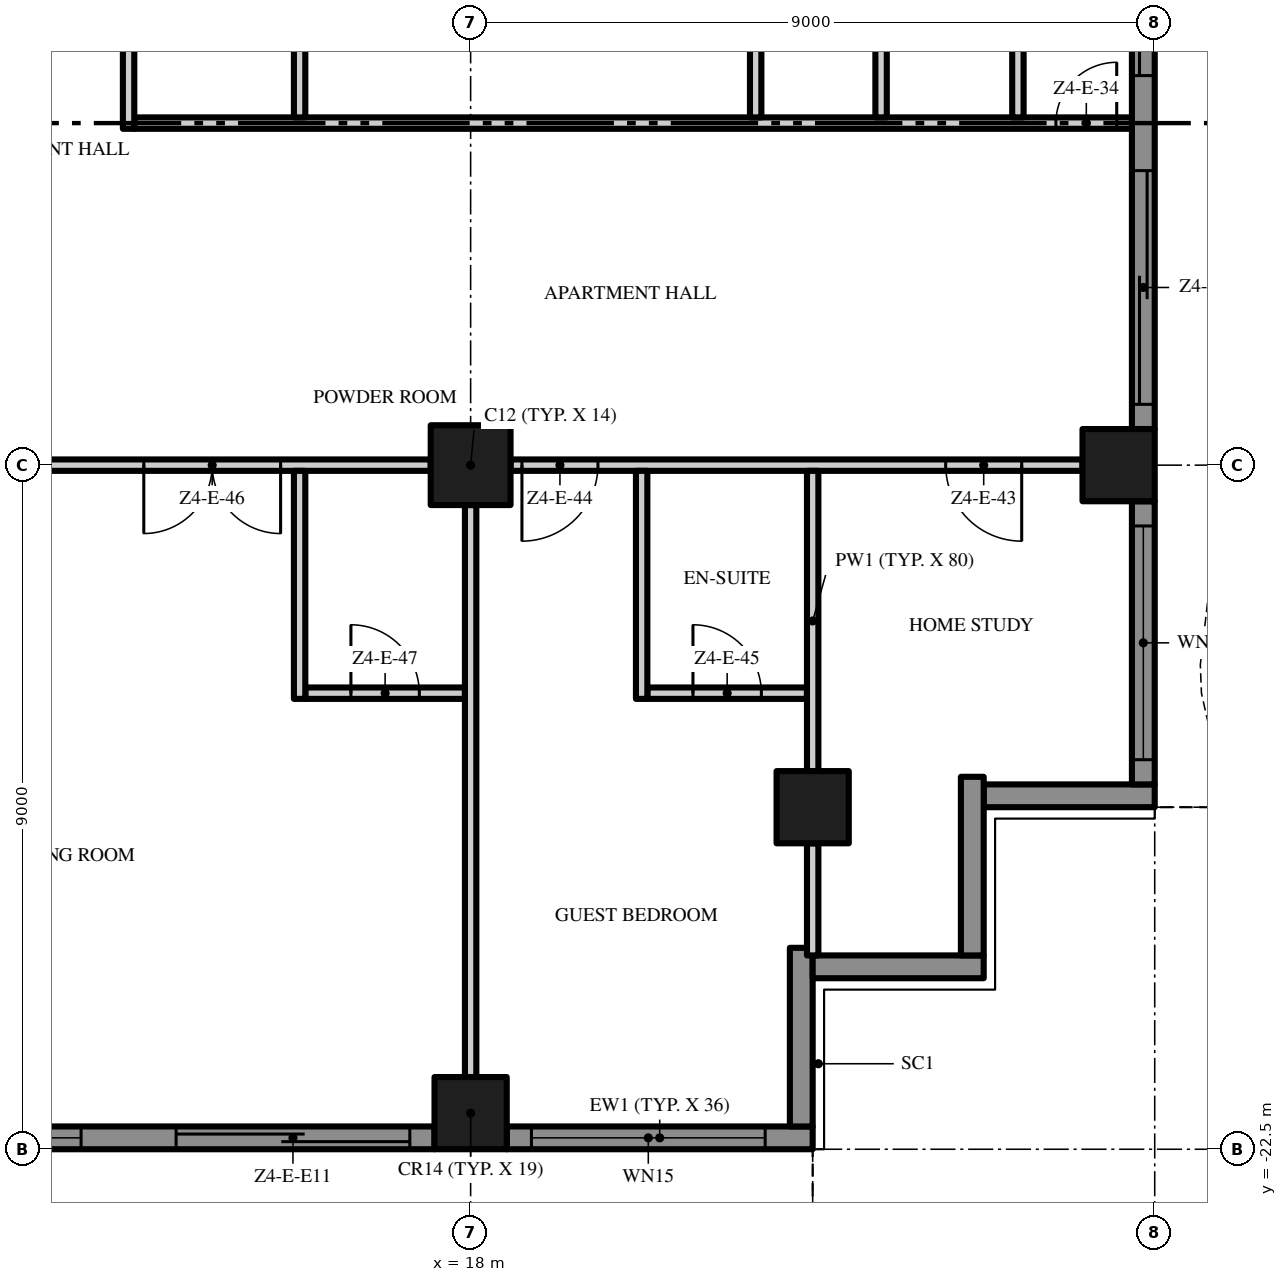
"""IFC4 building model, lengths in metres.
Left out: names, types, materials, properties, quantities, classifications, styles, units other than length and angle.
Written with IfcOpenShell. Run it as: python <this file> out.ifc"""

import sys

from ifc_helpers import new_model, si_unit, direction, frame, frame_2d, origin, origin_2d, place, context, subcontext, project, spatial, polyline, rectangle, outline, extrude, element, fill, save


model = new_model("IFC4")
c1 = context("Model", 3, precision=1e-05, world=origin(), true_north=direction((0.0, 1.0)))
c2 = subcontext(c1, "Body", "Model", "MODEL_VIEW")
j1 = project(units=[si_unit("LENGTHUNIT", "METRE"), si_unit("PLANEANGLEUNIT", "RADIAN")], contexts=[c1])
p1 = place(None, origin())
s1 = spatial("IfcSite", under=j1, at=p1, CompositionType="ELEMENT")
p2 = place(p1, origin())
s2 = spatial("IfcBuilding", under=s1, at=p2, CompositionType="ELEMENT")
p3 = place(p2, frame((0.0, 0.0, 230.0)))
s3 = spatial("IfcBuildingStorey", under=s2, at=p3, CompositionType="ELEMENT", Elevation=230.0)
p4 = place(p3, frame((18.0, -13.5, 0.0), z_axis=(0.0, 0.0, 1.0), x_axis=(1.0, 0.0, 0.0)))
e1 = element("IfcColumn", 1, at=p4, inside=s3, PredefinedType="COLUMN", context=c2, shape_type="SweptSolid", body=[
    extrude(rectangle(XDim=1.05, YDim=1.05, at=origin_2d()), origin(), (0.0, 0.0, 1.0), 3.5),
])
for number, where, z_axis, x_axis in (
    (2, (18.0, -22.025, 0.0), (0.0, 0.0, 1.0), (1.0, 0.0, 0.0)),
    (3, (26.525, -13.5, 0.0), (0.0, 0.0, 1.0), (1.0, 0.0, 0.0)),
    (4, (22.5, -18.0, 0.0), (0.0, 0.0, 1.0), (1.0, 0.0, 0.0)),
):
    element("IfcColumn", number, at=place(p3, frame(where, z_axis=z_axis, x_axis=x_axis)), inside=s3, PredefinedType="COLUMN", context=c2, shape_type="SweptSolid", body=[
        extrude(rectangle(XDim=0.95, YDim=0.95, at=origin_2d()), origin(), (0.0, 0.0, 1.0), 3.5),
    ])
p5 = place(p3, frame((17.525, -22.35, 0.0), z_axis=(0.0, 0.0, 1.0), x_axis=(-1.0, 0.0, 0.0)))
e5 = element("IfcWall", 5, at=p5, inside=s3, PredefinedType="SOLIDWALL", context=c2, shape_type="SweptSolid", body=[
    extrude(rectangle(XDim=8.05, YDim=0.3, at=frame_2d((4.025, 0.0))), origin(), (0.0, 0.0, 1.0), 3.5),
])
p6 = place(p5, frame((4.65, 0.0, 0.45)))
e6 = element("IfcOpeningElement", 6, at=p6, cuts=e5, PredefinedType="OPENING", context=c2, shape_type="SweptSolid", body=[
    extrude(rectangle(XDim=3.075, YDim=2.65, at=frame_2d((1.538, 1.325))), frame((0.0, 0.16, 0.0), z_axis=(0.0, -1.0, 0.0), x_axis=(1.0, 0.0, 0.0)), (0.0, 0.0, 1.0), 0.32),
])
p7 = place(p5, frame((0.325, 0.0, 0.0)))
e7 = element("IfcOpeningElement", 7, at=p7, cuts=e5, PredefinedType="OPENING", context=c2, shape_type="SweptSolid", body=[
    extrude(rectangle(XDim=3.075, YDim=2.4, at=frame_2d((1.538, 1.2))), frame((0.0, 0.16, 0.0), z_axis=(0.0, -1.0, 0.0), x_axis=(1.0, 0.0, 0.0)), (0.0, 0.0, 1.0), 0.32),
])
p8 = place(p3, frame((22.5, -22.35, 0.0), z_axis=(0.0, 0.0, 1.0), x_axis=(-1.0, 0.0, 0.0)))
e8 = element("IfcWall", 8, at=p8, inside=s3, PredefinedType="SOLIDWALL", context=c2, shape_type="SweptSolid", body=[
    extrude(rectangle(XDim=4.025, YDim=0.3, at=frame_2d((2.013, 0.0))), origin(), (0.0, 0.0, 1.0), 3.5),
])
p9 = place(p8, frame((0.625, 0.0, 0.45)))
e9 = element("IfcOpeningElement", 9, at=p9, cuts=e8, PredefinedType="OPENING", context=c2, shape_type="SweptSolid", body=[
    extrude(rectangle(XDim=3.075, YDim=2.65, at=frame_2d((1.538, 1.325))), frame((0.0, 0.16, 0.0), z_axis=(0.0, -1.0, 0.0), x_axis=(1.0, 0.0, 0.0)), (0.0, 0.0, 1.0), 0.32),
])
p10 = place(p3, frame((22.35, -19.85, 0.0), z_axis=(0.0, 0.0, 1.0), x_axis=(0.0, -1.0, 0.0)))
e10 = element("IfcWall", 10, at=p10, inside=s3, PredefinedType="SOLIDWALL", context=c2, shape_type="SweptSolid", body=[
    extrude(rectangle(XDim=2.35, YDim=0.3, at=frame_2d((1.175, 0.0))), origin(), (0.0, 0.0, 1.0), 3.5),
])
p11 = place(p3, frame((24.75, -20.1, 0.0), z_axis=(0.0, 0.0, 1.0), x_axis=(-1.0, 0.0, 0.0)))
e11 = element("IfcWall", 11, at=p11, inside=s3, PredefinedType="SOLIDWALL", context=c2, shape_type="SweptSolid", body=[
    extrude(rectangle(XDim=2.25, YDim=0.3, at=frame_2d((1.125, 0.0))), origin(), (0.0, 0.0, 1.0), 3.5),
])
p12 = place(p3, frame((24.6, -17.6, 0.0), z_axis=(0.0, 0.0, 1.0), x_axis=(0.0, -1.0, 0.0)))
e12 = element("IfcWall", 12, at=p12, inside=s3, PredefinedType="SOLIDWALL", context=c2, shape_type="SweptSolid", body=[
    extrude(rectangle(XDim=2.35, YDim=0.3, at=frame_2d((1.175, 0.0))), origin(), (0.0, 0.0, 1.0), 3.5),
])
p13 = place(p3, frame((27.0, -17.85, 0.0), z_axis=(0.0, 0.0, 1.0), x_axis=(-1.0, 0.0, 0.0)))
e13 = element("IfcWall", 13, at=p13, inside=s3, PredefinedType="SOLIDWALL", context=c2, shape_type="SweptSolid", body=[
    extrude(rectangle(XDim=2.25, YDim=0.3, at=frame_2d((1.125, 0.0))), origin(), (0.0, 0.0, 1.0), 3.5),
])
p14 = place(p3, frame((26.85, -13.975, 0.0), z_axis=(0.0, 0.0, 1.0), x_axis=(0.0, -1.0, 0.0)))
e14 = element("IfcWall", 14, at=p14, inside=s3, PredefinedType="SOLIDWALL", context=c2, shape_type="SweptSolid", body=[
    extrude(rectangle(XDim=3.725, YDim=0.3, at=frame_2d((1.863, 0.0))), origin(), (0.0, 0.0, 1.0), 3.5),
])
p15 = place(p14, frame((0.325, 0.0, 0.45)))
e15 = element("IfcOpeningElement", 15, at=p15, cuts=e14, PredefinedType="OPENING", context=c2, shape_type="SweptSolid", body=[
    extrude(rectangle(XDim=3.075, YDim=2.65, at=frame_2d((1.538, 1.325))), frame((0.0, 0.16, 0.0), z_axis=(0.0, -1.0, 0.0), x_axis=(1.0, 0.0, 0.0)), (0.0, 0.0, 1.0), 0.32),
])
p16 = place(p3, frame((26.85, -4.975, 0.0), z_axis=(0.0, 0.0, 1.0), x_axis=(0.0, -1.0, 0.0)))
e16 = element("IfcWall", 16, at=p16, inside=s3, PredefinedType="SOLIDWALL", context=c2, shape_type="SweptSolid", body=[
    extrude(rectangle(XDim=8.05, YDim=0.3, at=frame_2d((4.025, 0.0))), origin(), (0.0, 0.0, 1.0), 3.5),
])
p17 = place(p16, frame((4.65, 0.0, 0.0)))
e17 = element("IfcOpeningElement", 17, at=p17, cuts=e16, PredefinedType="OPENING", context=c2, shape_type="SweptSolid", body=[
    extrude(rectangle(XDim=3.075, YDim=2.4, at=frame_2d((1.538, 1.2))), frame((0.0, 0.16, 0.0), z_axis=(0.0, -1.0, 0.0), x_axis=(1.0, 0.0, 0.0)), (0.0, 0.0, 1.0), 0.32),
])
p18 = place(p16, frame((0.325, 0.0, 0.0)))
e18 = element("IfcOpeningElement", 18, at=p18, cuts=e16, PredefinedType="OPENING", context=c2, shape_type="SweptSolid", body=[
    extrude(rectangle(XDim=3.075, YDim=2.4, at=frame_2d((1.538, 1.2))), frame((0.0, 0.16, 0.0), z_axis=(0.0, -1.0, 0.0), x_axis=(1.0, 0.0, 0.0)), (0.0, 0.0, 1.0), 0.32),
])
p19 = place(p3, origin())
e19 = element("IfcWall", 19, at=p19, inside=s3, PredefinedType="USERDEFINED", context=c2, shape_type="SweptSolid", body=[
    extrude(outline(polyline([(-22.5, -23.451), (-21.0, -23.115), (-20.625, -23.1), (-19.5, -23.231), (-18.0, -23.755), (-16.5, -24.488), (-15.0, -25.149), (-13.5, -25.485), (-13.125, -25.5), (-12.0, -25.369), (-10.5, -24.845), (-9.0, -24.112), (-7.5, -23.451), (-6.0, -23.115), (-5.625, -23.1), (-4.5, -23.231), (-3.0, -23.755), (-1.5, -24.488), (0.0, -25.149), (1.5, -25.485), (1.875, -25.5), (3.0, -25.369), (4.5, -24.845), (6.0, -24.112), (7.5, -23.451), (9.0, -23.115), (9.375, -23.1), (10.5, -23.231), (12.0, -23.755), (13.5, -24.488), (15.0, -25.149), (16.5, -25.485), (16.875, -25.5), (18.0, -25.369), (19.5, -24.845), (21.0, -24.112), (22.5, -23.451), (22.399, -23.223), (20.895, -23.885), (19.404, -24.614), (17.944, -25.124), (16.865, -25.249), (16.533, -25.236), (15.079, -24.91), (13.605, -24.261), (12.096, -23.524), (10.556, -22.986), (9.385, -22.849), (8.967, -22.866), (7.421, -23.213), (5.895, -23.885), (4.404, -24.614), (2.944, -25.124), (1.865, -25.249), (1.533, -25.236), (0.079, -24.91), (-1.395, -24.261), (-2.904, -23.524), (-4.444, -22.986), (-5.615, -22.849), (-6.033, -22.866), (-7.579, -23.213), (-9.105, -23.885), (-10.596, -24.614), (-12.056, -25.124), (-13.135, -25.249), (-13.467, -25.236), (-14.921, -24.91), (-16.395, -24.261), (-17.904, -23.524), (-19.444, -22.986), (-20.615, -22.849), (-21.033, -22.866), (-22.555, -23.208), (-22.5, -23.451)])), origin(), (0.0, 0.0, 1.0), 0.9),
])
p20 = place(p3, origin())
e20 = element("IfcWall", 20, at=p20, inside=s3, PredefinedType="USERDEFINED", context=c2, shape_type="SweptSolid", body=[
    extrude(outline(polyline([(27.951, -18.0), (27.615, -16.5), (27.6, -16.125), (27.731, -15.0), (28.255, -13.5), (28.988, -12.0), (29.649, -10.5), (29.985, -9.0), (30.0, -8.625), (29.869, -7.5), (29.345, -6.0), (28.612, -4.5), (27.951, -3.0), (27.615, -1.5), (27.6, -1.125), (27.731, 0.0), (28.255, 1.5), (28.988, 3.0), (29.649, 4.5), (29.985, 6.0), (30.0, 6.375), (29.869, 7.5), (29.345, 9.0), (28.612, 10.5), (27.951, 12.0), (27.615, 13.5), (27.6, 13.875), (27.731, 15.0), (28.255, 16.5), (28.988, 18.0), (28.763, 18.11), (28.024, 16.596), (27.486, 15.056), (27.349, 13.885), (27.366, 13.467), (27.713, 11.921), (28.385, 10.395), (29.114, 8.904), (29.624, 7.444), (29.749, 6.365), (29.736, 6.033), (29.41, 4.579), (28.761, 3.105), (28.024, 1.596), (27.486, 0.056), (27.349, -1.115), (27.366, -1.533), (27.713, -3.079), (28.385, -4.605), (29.114, -6.096), (29.624, -7.556), (29.749, -8.635), (29.736, -8.967), (29.41, -10.421), (28.761, -11.895), (28.024, -13.404), (27.486, -14.944), (27.349, -16.115), (27.366, -16.533), (27.708, -18.055), (27.951, -18.0)])), origin(), (0.0, 0.0, 1.0), 0.9),
])
p21 = place(p3, frame((15.825, -16.5, 0.0), z_axis=(0.0, 0.0, 1.0), x_axis=(1.0, 0.0, 0.0)))
e21 = element("IfcWall", 21, at=p21, inside=s3, PredefinedType="PARTITIONING", context=c2, shape_type="SweptSolid", body=[
    extrude(rectangle(XDim=2.1, YDim=0.15, at=frame_2d((1.05, 0.0))), origin(), (0.0, 0.0, 1.0), 3.5),
])
p22 = place(p21, frame((0.6, 0.0, 0.0)))
e22 = element("IfcOpeningElement", 22, at=p22, cuts=e21, PredefinedType="OPENING", context=c2, shape_type="SweptSolid", body=[
    extrude(rectangle(XDim=0.9, YDim=2.1, at=frame_2d((0.45, 1.05))), frame((0.0, 0.085, 0.0), z_axis=(0.0, -1.0, 0.0), x_axis=(1.0, 0.0, 0.0)), (0.0, 0.0, 1.0), 0.17),
])
p23 = place(p3, frame((20.325, -16.5, 0.0), z_axis=(0.0, 0.0, 1.0), x_axis=(1.0, 0.0, 0.0)))
e23 = element("IfcWall", 23, at=p23, inside=s3, PredefinedType="PARTITIONING", context=c2, shape_type="SweptSolid", body=[
    extrude(rectangle(XDim=2.1, YDim=0.15, at=frame_2d((1.05, 0.0))), origin(), (0.0, 0.0, 1.0), 3.5),
])
p24 = place(p23, frame((0.6, 0.0, 0.0)))
e24 = element("IfcOpeningElement", 24, at=p24, cuts=e23, PredefinedType="OPENING", context=c2, shape_type="SweptSolid", body=[
    extrude(rectangle(XDim=0.9, YDim=2.1, at=frame_2d((0.45, 1.05))), frame((0.0, 0.085, 0.0), z_axis=(0.0, -1.0, 0.0), x_axis=(1.0, 0.0, 0.0)), (0.0, 0.0, 1.0), 0.17),
])
p25 = place(p3, frame((17.475, -13.5, 0.0), z_axis=(0.0, 0.0, 1.0), x_axis=(-1.0, 0.0, 0.0)))
e25 = element("IfcWall", 25, at=p25, inside=s3, PredefinedType="PARTITIONING", context=c2, shape_type="SweptSolid", body=[
    extrude(rectangle(XDim=7.95, YDim=0.15, at=frame_2d((3.975, 0.0))), origin(), (0.0, 0.0, 1.0), 3.5),
])
p26 = place(p25, frame((1.975, 0.0, 0.0)))
e26 = element("IfcOpeningElement", 26, at=p26, cuts=e25, PredefinedType="OPENING", context=c2, shape_type="SweptSolid", body=[
    extrude(rectangle(XDim=1.8, YDim=2.4, at=frame_2d((0.9, 1.2))), frame((0.0, 0.085, 0.0), z_axis=(0.0, -1.0, 0.0), x_axis=(1.0, 0.0, 0.0)), (0.0, 0.0, 1.0), 0.17),
])
p27 = place(p3, frame((26.05, -13.5, 0.0), z_axis=(0.0, 0.0, 1.0), x_axis=(-1.0, 0.0, 0.0)))
e27 = element("IfcWall", 27, at=p27, inside=s3, PredefinedType="PARTITIONING", context=c2, shape_type="SweptSolid", body=[
    extrude(rectangle(XDim=7.525, YDim=0.15, at=frame_2d((3.763, 0.0))), origin(), (0.0, 0.0, 1.0), 3.5),
])
p28 = place(p27, frame((0.8, 0.0, 0.0)))
e28 = element("IfcOpeningElement", 28, at=p28, cuts=e27, PredefinedType="OPENING", context=c2, shape_type="SweptSolid", body=[
    extrude(rectangle(XDim=1.0, YDim=2.4, at=frame_2d((0.5, 1.2))), frame((0.0, 0.085, 0.0), z_axis=(0.0, -1.0, 0.0), x_axis=(1.0, 0.0, 0.0)), (0.0, 0.0, 1.0), 0.17),
])
p29 = place(p27, frame((6.375, 0.0, 0.0)))
e29 = element("IfcOpeningElement", 29, at=p29, cuts=e27, PredefinedType="OPENING", context=c2, shape_type="SweptSolid", body=[
    extrude(rectangle(XDim=1.0, YDim=2.4, at=frame_2d((0.5, 1.2))), frame((0.0, 0.085, 0.0), z_axis=(0.0, -1.0, 0.0), x_axis=(1.0, 0.0, 0.0)), (0.0, 0.0, 1.0), 0.17),
])
p30 = place(p3, frame((13.575, -9.0, 0.0), z_axis=(0.0, 0.0, 1.0), x_axis=(1.0, 0.0, 0.0)))
e30 = element("IfcWall", 30, at=p30, inside=s3, PredefinedType="PARTITIONING", context=c2, shape_type="SweptSolid", body=[
    extrude(rectangle(XDim=13.125, YDim=0.15, at=frame_2d((6.562, 0.0))), origin(), (0.0, 0.0, 1.0), 3.5),
])
p31 = place(p30, frame((12.125, 0.0, 0.0)))
e31 = element("IfcOpeningElement", 31, at=p31, cuts=e30, PredefinedType="OPENING", context=c2, shape_type="SweptSolid", body=[
    extrude(rectangle(XDim=0.8, YDim=2.0, at=frame_2d((0.4, 1.0))), frame((0.0, 0.085, 0.0), z_axis=(0.0, -1.0, 0.0), x_axis=(1.0, 0.0, 0.0)), (0.0, 0.0, 1.0), 0.17),
])
p32 = place(p3, frame((13.5, -4.425, 0.0), z_axis=(0.0, 0.0, 1.0), x_axis=(0.0, -1.0, 0.0)))
e32 = element("IfcWall", 32, at=p32, inside=s3, PredefinedType="PARTITIONING", context=c2, shape_type="SweptSolid", body=[
    extrude(rectangle(XDim=4.65, YDim=0.15, at=frame_2d((2.325, 0.0))), origin(), (0.0, 0.0, 1.0), 3.5),
])
p33 = place(p32, frame((1.875, 0.0, 0.0)))
e33 = element("IfcOpeningElement", 33, at=p33, cuts=e32, PredefinedType="OPENING", context=c2, shape_type="SweptSolid", body=[
    extrude(rectangle(XDim=0.9, YDim=2.1, at=frame_2d((0.45, 1.05))), frame((0.0, 0.085, 0.0), z_axis=(0.0, -1.0, 0.0), x_axis=(1.0, 0.0, 0.0)), (0.0, 0.0, 1.0), 0.17),
])
p34 = place(p3, frame((15.75, -16.575, 0.0), z_axis=(0.0, 0.0, 1.0), x_axis=(0.0, 1.0, 0.0)))
e34 = element("IfcWall", 34, at=p34, inside=s3, PredefinedType="PARTITIONING", context=c2, shape_type="SweptSolid", body=[
    extrude(rectangle(XDim=3.0, YDim=0.15, at=frame_2d((1.5, 0.0))), origin(), (0.0, 0.0, 1.0), 3.5),
])
p35 = place(p3, frame((15.75, -8.925, 0.0), z_axis=(0.0, 0.0, 1.0), x_axis=(0.0, 1.0, 0.0)))
e35 = element("IfcWall", 35, at=p35, inside=s3, PredefinedType="PARTITIONING", context=c2, shape_type="SweptSolid", body=[
    extrude(rectangle(XDim=4.35, YDim=0.15, at=frame_2d((2.175, 0.0))), origin(), (0.0, 0.0, 1.0), 3.5),
])
p36 = place(p3, frame((18.0, -21.55, 0.0), z_axis=(0.0, 0.0, 1.0), x_axis=(0.0, 1.0, 0.0)))
e36 = element("IfcWall", 36, at=p36, inside=s3, PredefinedType="PARTITIONING", context=c2, shape_type="SweptSolid", body=[
    extrude(rectangle(XDim=7.525, YDim=0.15, at=frame_2d((3.763, 0.0))), origin(), (0.0, 0.0, 1.0), 3.5),
])
p37 = place(p3, frame((20.25, -16.575, 0.0), z_axis=(0.0, 0.0, 1.0), x_axis=(0.0, 1.0, 0.0)))
e37 = element("IfcWall", 37, at=p37, inside=s3, PredefinedType="PARTITIONING", context=c2, shape_type="SweptSolid", body=[
    extrude(rectangle(XDim=3.0, YDim=0.15, at=frame_2d((1.5, 0.0))), origin(), (0.0, 0.0, 1.0), 3.5),
])
p38 = place(p3, frame((21.75, -8.925, 0.0), z_axis=(0.0, 0.0, 1.0), x_axis=(0.0, 1.0, 0.0)))
e38 = element("IfcWall", 38, at=p38, inside=s3, PredefinedType="PARTITIONING", context=c2, shape_type="SweptSolid", body=[
    extrude(rectangle(XDim=4.35, YDim=0.15, at=frame_2d((2.175, 0.0))), origin(), (0.0, 0.0, 1.0), 3.5),
])
p39 = place(p3, frame((22.5, -19.95, 0.0), z_axis=(0.0, 0.0, 1.0), x_axis=(0.0, 1.0, 0.0)))
e39 = element("IfcWall", 39, at=p39, inside=s3, PredefinedType="PARTITIONING", context=c2, shape_type="SweptSolid", body=[
    extrude(rectangle(XDim=1.475, YDim=0.15, at=frame_2d((0.738, 0.0))), origin(), (0.0, 0.0, 1.0), 3.5),
])
p40 = place(p3, frame((22.5, -17.525, 0.0), z_axis=(0.0, 0.0, 1.0), x_axis=(0.0, 1.0, 0.0)))
e40 = element("IfcWall", 40, at=p40, inside=s3, PredefinedType="PARTITIONING", context=c2, shape_type="SweptSolid", body=[
    extrude(rectangle(XDim=3.95, YDim=0.15, at=frame_2d((1.975, 0.0))), origin(), (0.0, 0.0, 1.0), 3.5),
])
for number, where, z_axis, x_axis in (
    (41, (23.4, -8.925, 0.0), (0.0, 0.0, 1.0), (0.0, 1.0, 0.0)),
    (42, (25.2, -8.925, 0.0), (0.0, 0.0, 1.0), (0.0, 1.0, 0.0)),
):
    element("IfcWall", number, at=place(p3, frame(where, z_axis=z_axis, x_axis=x_axis)), inside=s3, PredefinedType="PARTITIONING", context=c2, shape_type="SweptSolid", body=[
        extrude(rectangle(XDim=4.35, YDim=0.15, at=frame_2d((2.175, 0.0))), origin(), (0.0, 0.0, 1.0), 3.5),
    ])
p41 = place(p6, origin())
e43 = element("IfcWindow", 43, at=p41, inside=s3, PartitioningType="SINGLE_PANEL", PredefinedType="WINDOW", context=c2, shape_type="SweptSolid", body=[
    extrude(rectangle(XDim=3.075, YDim=2.65, at=frame_2d((1.538, 1.325))), frame((0.0, 0.03, 0.0), z_axis=(0.0, -1.0, 0.0), x_axis=(1.0, 0.0, 0.0)), (0.0, 0.0, 1.0), 0.06),
])
fill(e6, e43)
p42 = place(p7, origin())
e44 = element("IfcDoor", 44, at=p42, inside=s3, OperationType="SINGLE_SWING_LEFT", PredefinedType="DOOR", context=c2, shape_type="SweptSolid", body=[
    extrude(rectangle(XDim=3.075, YDim=2.4, at=frame_2d((1.538, 1.2))), frame((0.0, 0.025, 0.0), z_axis=(0.0, -1.0, 0.0), x_axis=(1.0, 0.0, 0.0)), (0.0, 0.0, 1.0), 0.05),
])
fill(e7, e44)
p43 = place(p9, origin())
e45 = element("IfcWindow", 45, at=p43, inside=s3, PartitioningType="SINGLE_PANEL", PredefinedType="WINDOW", context=c2, shape_type="SweptSolid", body=[
    extrude(rectangle(XDim=3.075, YDim=2.65, at=frame_2d((1.538, 1.325))), frame((0.0, 0.03, 0.0), z_axis=(0.0, -1.0, 0.0), x_axis=(1.0, 0.0, 0.0)), (0.0, 0.0, 1.0), 0.06),
])
fill(e9, e45)
p44 = place(p15, origin())
e46 = element("IfcWindow", 46, at=p44, inside=s3, PartitioningType="SINGLE_PANEL", PredefinedType="WINDOW", context=c2, shape_type="SweptSolid", body=[
    extrude(rectangle(XDim=3.075, YDim=2.65, at=frame_2d((1.538, 1.325))), frame((0.0, 0.03, 0.0), z_axis=(0.0, -1.0, 0.0), x_axis=(1.0, 0.0, 0.0)), (0.0, 0.0, 1.0), 0.06),
])
fill(e15, e46)
p45 = place(p17, origin())
e47 = element("IfcDoor", 47, at=p45, inside=s3, OperationType="SINGLE_SWING_LEFT", PredefinedType="DOOR", context=c2, shape_type="SweptSolid", body=[
    extrude(rectangle(XDim=3.075, YDim=2.4, at=frame_2d((1.538, 1.2))), frame((0.0, 0.025, 0.0), z_axis=(0.0, -1.0, 0.0), x_axis=(1.0, 0.0, 0.0)), (0.0, 0.0, 1.0), 0.05),
])
fill(e17, e47)
p46 = place(p18, origin())
e48 = element("IfcDoor", 48, at=p46, inside=s3, OperationType="SINGLE_SWING_LEFT", PredefinedType="DOOR", context=c2, shape_type="SweptSolid", body=[
    extrude(rectangle(XDim=3.075, YDim=2.4, at=frame_2d((1.538, 1.2))), frame((0.0, 0.025, 0.0), z_axis=(0.0, -1.0, 0.0), x_axis=(1.0, 0.0, 0.0)), (0.0, 0.0, 1.0), 0.05),
])
fill(e18, e48)
p47 = place(p31, origin())
e49 = element("IfcDoor", 49, at=p47, inside=s3, OperationType="SINGLE_SWING_RIGHT", PredefinedType="DOOR", context=c2, shape_type="SweptSolid", body=[
    extrude(rectangle(XDim=0.8, YDim=2.0, at=frame_2d((0.4, 1.0))), frame((0.0, 0.025, 0.0), z_axis=(0.0, -1.0, 0.0), x_axis=(1.0, 0.0, 0.0)), (0.0, 0.0, 1.0), 0.05),
])
fill(e31, e49)
p48 = place(p28, origin())
e50 = element("IfcDoor", 50, at=p48, inside=s3, OperationType="SINGLE_SWING_LEFT", PredefinedType="DOOR", context=c2, shape_type="SweptSolid", body=[
    extrude(rectangle(XDim=1.0, YDim=2.4, at=frame_2d((0.5, 1.2))), frame((0.0, 0.025, 0.0), z_axis=(0.0, -1.0, 0.0), x_axis=(1.0, 0.0, 0.0)), (0.0, 0.0, 1.0), 0.05),
])
fill(e28, e50)
p49 = place(p29, origin())
e51 = element("IfcDoor", 51, at=p49, inside=s3, OperationType="SINGLE_SWING_RIGHT", PredefinedType="DOOR", context=c2, shape_type="SweptSolid", body=[
    extrude(rectangle(XDim=1.0, YDim=2.4, at=frame_2d((0.5, 1.2))), frame((0.0, 0.025, 0.0), z_axis=(0.0, -1.0, 0.0), x_axis=(1.0, 0.0, 0.0)), (0.0, 0.0, 1.0), 0.05),
])
fill(e29, e51)
p50 = place(p24, origin())
e52 = element("IfcDoor", 52, at=p50, inside=s3, OperationType="SINGLE_SWING_LEFT", PredefinedType="DOOR", context=c2, shape_type="SweptSolid", body=[
    extrude(rectangle(XDim=0.9, YDim=2.1, at=frame_2d((0.45, 1.05))), frame((0.0, 0.025, 0.0), z_axis=(0.0, -1.0, 0.0), x_axis=(1.0, 0.0, 0.0)), (0.0, 0.0, 1.0), 0.05),
])
fill(e24, e52)
p51 = place(p26, origin())
e53 = element("IfcDoor", 53, at=p51, inside=s3, OperationType="DOUBLE_DOOR_SINGLE_SWING", PredefinedType="DOOR", context=c2, shape_type="SweptSolid", body=[
    extrude(rectangle(XDim=1.8, YDim=2.4, at=frame_2d((0.9, 1.2))), frame((0.0, 0.025, 0.0), z_axis=(0.0, -1.0, 0.0), x_axis=(1.0, 0.0, 0.0)), (0.0, 0.0, 1.0), 0.05),
])
fill(e26, e53)
p52 = place(p22, origin())
e54 = element("IfcDoor", 54, at=p52, inside=s3, OperationType="SINGLE_SWING_LEFT", PredefinedType="DOOR", context=c2, shape_type="SweptSolid", body=[
    extrude(rectangle(XDim=0.9, YDim=2.1, at=frame_2d((0.45, 1.05))), frame((0.0, 0.025, 0.0), z_axis=(0.0, -1.0, 0.0), x_axis=(1.0, 0.0, 0.0)), (0.0, 0.0, 1.0), 0.05),
])
fill(e22, e54)
save(model, sys.argv[1])
